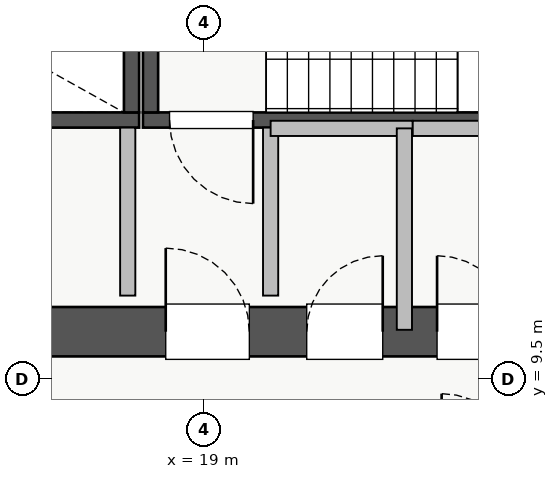
"""IFC4 building model, lengths in metres.
Left out: names, types, materials, properties, quantities, classifications, styles, units other than length and angle.
Written with IfcOpenShell. Run it as: python <this file> out.ifc"""

import sys

from ifc_helpers import new_model, si_unit, direction, frame, frame_2d, origin, place, context, subcontext, project, spatial, rectangle, extrude, source, transform, mapped, element, fill, save


model = new_model("IFC4")
c1 = context("Model", 3, precision=1e-05, world=origin(), true_north=direction((0.0, 1.0)))
c2 = subcontext(c1, "Body", "Model", "MODEL_VIEW")
j1 = project(units=[si_unit("LENGTHUNIT", "METRE"), si_unit("PLANEANGLEUNIT", "RADIAN")], contexts=[c1])
p1 = place(None, origin())
s1 = spatial("IfcSite", under=j1, at=p1, CompositionType="ELEMENT")
p2 = place(p1, origin())
s2 = spatial("IfcBuilding", under=s1, at=p2, CompositionType="ELEMENT")
p3 = place(p2, frame((0.0, 0.0, 182.75)))
s3 = spatial("IfcBuildingStorey", under=s2, at=p3, CompositionType="ELEMENT", Elevation=182.75)
p4 = place(p3, frame((10.85, 12.91, 0.0), z_axis=(0.0, 0.0, 1.0), x_axis=(1.0, 0.0, 0.0)))
e1 = element("IfcWall", 1, at=p4, inside=s3, PredefinedType="SHEAR", context=c2, shape_type="SweptSolid", body=[
    extrude(rectangle(XDim=7.3, YDim=0.2, at=frame_2d((3.65, 0.0))), origin(), (0.0, 0.0, 1.0), 3.25),
])
p5 = place(p4, frame((0.35, 0.0, 0.0)))
e2 = element("IfcOpeningElement", 2, at=p5, cuts=e1, PredefinedType="OPENING", context=c2, shape_type="SweptSolid", body=[
    extrude(rectangle(XDim=1.1, YDim=2.05, at=frame_2d((0.55, 1.025))), frame((0.0, 0.11, 0.0), z_axis=(0.0, -1.0, 0.0), x_axis=(1.0, 0.0, 0.0)), (0.0, 0.0, 1.0), 0.22),
])
p6 = place(p3, frame((18.05, 13.01, 0.0), z_axis=(0.0, 0.0, 1.0), x_axis=(0.0, 1.0, 0.0)))
e3 = element("IfcWall", 3, at=p6, inside=s3, PredefinedType="SHEAR", context=c2, shape_type="SweptSolid", body=[
    extrude(rectangle(XDim=2.94, YDim=0.2, at=frame_2d((1.47, 0.0))), origin(), (0.0, 0.0, 1.0), 3.25),
])
p7 = place(p3, frame((18.2, 12.91, 0.0), z_axis=(0.0, 0.0, 1.0), x_axis=(1.0, 0.0, 0.0)))
e4 = element("IfcWall", 4, at=p7, inside=s3, PredefinedType="SHEAR", context=c2, shape_type="SweptSolid", body=[
    extrude(rectangle(XDim=7.15, YDim=0.2, at=frame_2d((3.575, 0.0))), origin(), (0.0, 0.0, 1.0), 3.25),
])
p8 = place(p7, frame((0.35, 0.0, 0.0)))
e5 = element("IfcOpeningElement", 5, at=p8, cuts=e4, PredefinedType="OPENING", context=c2, shape_type="SweptSolid", body=[
    extrude(rectangle(XDim=1.1, YDim=2.05, at=frame_2d((0.55, 1.025))), frame((0.0, 0.11, 0.0), z_axis=(0.0, -1.0, 0.0), x_axis=(1.0, 0.0, 0.0)), (0.0, 0.0, 1.0), 0.22),
])
p9 = place(p3, frame((18.3, 13.01, 0.0), z_axis=(0.0, 0.0, 1.0), x_axis=(0.0, 1.0, 0.0)))
e6 = element("IfcWall", 6, at=p9, inside=s3, PredefinedType="SHEAR", context=c2, shape_type="SweptSolid", body=[
    extrude(rectangle(XDim=2.94, YDim=0.2, at=frame_2d((1.47, 0.0))), origin(), (0.0, 0.0, 1.0), 3.25),
])
p10 = place(p3, frame((10.2, 10.125, 0.0), z_axis=(0.0, 0.0, 1.0), x_axis=(1.0, 0.0, 0.0)))
e7 = element("IfcWall", 7, at=p10, inside=s3, PredefinedType="SHEAR", context=c2, shape_type="SweptSolid", body=[
    extrude(rectangle(XDim=17.6, YDim=0.65, at=frame_2d((8.8, 0.0))), origin(), (0.0, 0.0, 1.0), 3.25),
])
p11 = place(p10, frame((1.15, 0.0, 0.0)))
e8 = element("IfcOpeningElement", 8, at=p11, cuts=e7, PredefinedType="OPENING", context=c2, shape_type="SweptSolid", body=[
    extrude(rectangle(XDim=1.1, YDim=2.05, at=frame_2d((0.55, 1.025))), frame((0.0, 0.335, 0.0), z_axis=(0.0, -1.0, 0.0), x_axis=(1.0, 0.0, 0.0)), (0.0, 0.0, 1.0), 0.67),
])
p12 = place(p10, frame((8.3, 0.0, 0.0)))
e9 = element("IfcOpeningElement", 9, at=p12, cuts=e7, PredefinedType="OPENING", context=c2, shape_type="SweptSolid", body=[
    extrude(rectangle(XDim=1.1, YDim=2.05, at=frame_2d((0.55, 1.025))), frame((0.0, 0.335, 0.0), z_axis=(0.0, -1.0, 0.0), x_axis=(1.0, 0.0, 0.0)), (0.0, 0.0, 1.0), 0.67),
])
p13 = place(p10, frame((4.9, 0.0, 0.0)))
e10 = element("IfcOpeningElement", 10, at=p13, cuts=e7, PredefinedType="OPENING", context=c2, shape_type="SweptSolid", body=[
    extrude(rectangle(XDim=1.1, YDim=2.05, at=frame_2d((0.55, 1.025))), frame((0.0, 0.335, 0.0), z_axis=(0.0, -1.0, 0.0), x_axis=(1.0, 0.0, 0.0)), (0.0, 0.0, 1.0), 0.67),
])
p14 = place(p10, frame((14.74, 0.0, 0.0)))
e11 = element("IfcOpeningElement", 11, at=p14, cuts=e7, PredefinedType="OPENING", context=c2, shape_type="SweptSolid", body=[
    extrude(rectangle(XDim=1.0, YDim=2.05, at=frame_2d((0.5, 1.025))), frame((0.0, 0.335, 0.0), z_axis=(0.0, -1.0, 0.0), x_axis=(1.0, 0.0, 0.0)), (0.0, 0.0, 1.0), 0.67),
])
p15 = place(p10, frame((10.155, 0.0, 0.0)))
e12 = element("IfcOpeningElement", 12, at=p15, cuts=e7, PredefinedType="OPENING", context=c2, shape_type="SweptSolid", body=[
    extrude(rectangle(XDim=1.0, YDim=2.05, at=frame_2d((0.5, 1.025))), frame((0.0, 0.335, 0.0), z_axis=(0.0, -1.0, 0.0), x_axis=(1.0, 0.0, 0.0)), (0.0, 0.0, 1.0), 0.67),
])
p16 = place(p10, frame((11.87, 0.0, 0.0)))
e13 = element("IfcOpeningElement", 13, at=p16, cuts=e7, PredefinedType="OPENING", context=c2, shape_type="SweptSolid", body=[
    extrude(rectangle(XDim=1.0, YDim=2.05, at=frame_2d((0.5, 1.025))), frame((0.0, 0.335, 0.0), z_axis=(0.0, -1.0, 0.0), x_axis=(1.0, 0.0, 0.0)), (0.0, 0.0, 1.0), 0.67),
])
p17 = place(p10, frame((13.46, 0.0, 0.0)))
e14 = element("IfcOpeningElement", 14, at=p17, cuts=e7, PredefinedType="OPENING", context=c2, shape_type="SweptSolid", body=[
    extrude(rectangle(XDim=1.0, YDim=2.05, at=frame_2d((0.5, 1.025))), frame((0.0, 0.335, 0.0), z_axis=(0.0, -1.0, 0.0), x_axis=(1.0, 0.0, 0.0)), (0.0, 0.0, 1.0), 0.67),
])
for number, where, z_axis, x_axis in (
    (15, (18.0, 10.6, 0.0), (0.0, 0.0, 1.0), (0.0, 1.0, 0.0)),
    (16, (19.88, 10.6, 0.0), (0.0, 0.0, 1.0), (0.0, 1.0, 0.0)),
):
    element("IfcWall", number, at=place(p3, frame(where, z_axis=z_axis, x_axis=x_axis)), inside=s3, PredefinedType="PARTITIONING", context=c2, shape_type="SweptSolid", body=[
        extrude(rectangle(XDim=2.21, YDim=0.2, at=frame_2d((1.105, 0.0))), origin(), (0.0, 0.0, 1.0), 3.03),
    ])
p18 = place(p3, frame((19.88, 12.8, 0.0), z_axis=(0.0, 0.0, 1.0), x_axis=(1.0, 0.0, 0.0)))
e17 = element("IfcWall", 17, at=p18, inside=s3, PredefinedType="PARTITIONING", context=c2, shape_type="SweptSolid", body=[
    extrude(rectangle(XDim=1.87, YDim=0.2, at=frame_2d((0.935, 0.0))), origin(), (0.0, 0.0, 1.0), 3.03),
])
p19 = place(p3, frame((21.64, 10.15, 0.0), z_axis=(0.0, 0.0, 1.0), x_axis=(0.0, 1.0, 0.0)))
e18 = element("IfcWall", 18, at=p19, inside=s3, PredefinedType="PARTITIONING", context=c2, shape_type="SweptSolid", body=[
    extrude(rectangle(XDim=2.65, YDim=0.2, at=frame_2d((1.325, 0.0))), origin(), (0.0, 0.0, 1.0), 3.03),
])
p20 = place(p3, frame((21.75, 12.8, 0.0), z_axis=(0.0, 0.0, 1.0), x_axis=(1.0, 0.0, 0.0)))
e19 = element("IfcWall", 19, at=p20, inside=s3, PredefinedType="PARTITIONING", context=c2, shape_type="SweptSolid", body=[
    extrude(rectangle(XDim=5.17, YDim=0.2, at=frame_2d((2.585, 0.0))), origin(), (0.0, 0.0, 1.0), 3.03),
])
m1 = source(origin(), c2, "Body", "SweptSolid", [
    extrude(rectangle(XDim=1.1, YDim=2.05, at=frame_2d((0.55, 1.025))), frame((0.0, 0.025, 0.0), z_axis=(0.0, -1.0, 0.0), x_axis=(1.0, 0.0, 0.0)), (0.0, 0.0, 1.0), 0.05),
])
p21 = place(p12, origin())
e20 = element("IfcDoor", 20, at=p21, inside=s3, OperationType="SINGLE_SWING_LEFT", PredefinedType="DOOR", context=c2, shape_type="MappedRepresentation", body=[
    mapped(m1, transform((0.0, 0.0, 0.0), x_axis=(1.0, 0.0, 0.0), y_axis=(0.0, 1.0, 0.0), z_axis=(0.0, 0.0, 1.0), scale=1.0)),
])
fill(e9, e20)
p22 = place(p8, frame((1.1, 0.0, 0.0), z_axis=(0.0, 0.0, 1.0), x_axis=(-1.0, 0.0, 0.0)))
e21 = element("IfcDoor", 21, at=p22, inside=s3, OperationType="SINGLE_SWING_RIGHT", PredefinedType="DOOR", context=c2, shape_type="MappedRepresentation", body=[
    mapped(m1, transform((0.0, 0.0, 0.0), x_axis=(1.0, 0.0, 0.0), y_axis=(0.0, 1.0, 0.0), z_axis=(0.0, 0.0, 1.0), scale=1.0)),
])
fill(e5, e21)
m2 = source(origin(), c2, "Body", "SweptSolid", [
    extrude(rectangle(XDim=1.0, YDim=2.05, at=frame_2d((0.5, 1.025))), frame((0.0, 0.025, 0.0), z_axis=(0.0, -1.0, 0.0), x_axis=(1.0, 0.0, 0.0)), (0.0, 0.0, 1.0), 0.05),
])
p23 = place(p15, origin())
e22 = element("IfcDoor", 22, at=p23, inside=s3, OperationType="SINGLE_SWING_RIGHT", PredefinedType="DOOR", context=c2, shape_type="MappedRepresentation", body=[
    mapped(m2, transform((0.0, 0.0, 0.0), x_axis=(1.0, 0.0, 0.0), y_axis=(0.0, 1.0, 0.0), z_axis=(0.0, 0.0, 1.0), scale=1.0)),
])
fill(e12, e22)
p24 = place(p16, origin())
e23 = element("IfcDoor", 23, at=p24, inside=s3, OperationType="SINGLE_SWING_LEFT", PredefinedType="DOOR", context=c2, shape_type="MappedRepresentation", body=[
    mapped(m2, transform((0.0, 0.0, 0.0), x_axis=(1.0, 0.0, 0.0), y_axis=(0.0, 1.0, 0.0), z_axis=(0.0, 0.0, 1.0), scale=1.0)),
])
fill(e13, e23)
save(model, sys.argv[1])
